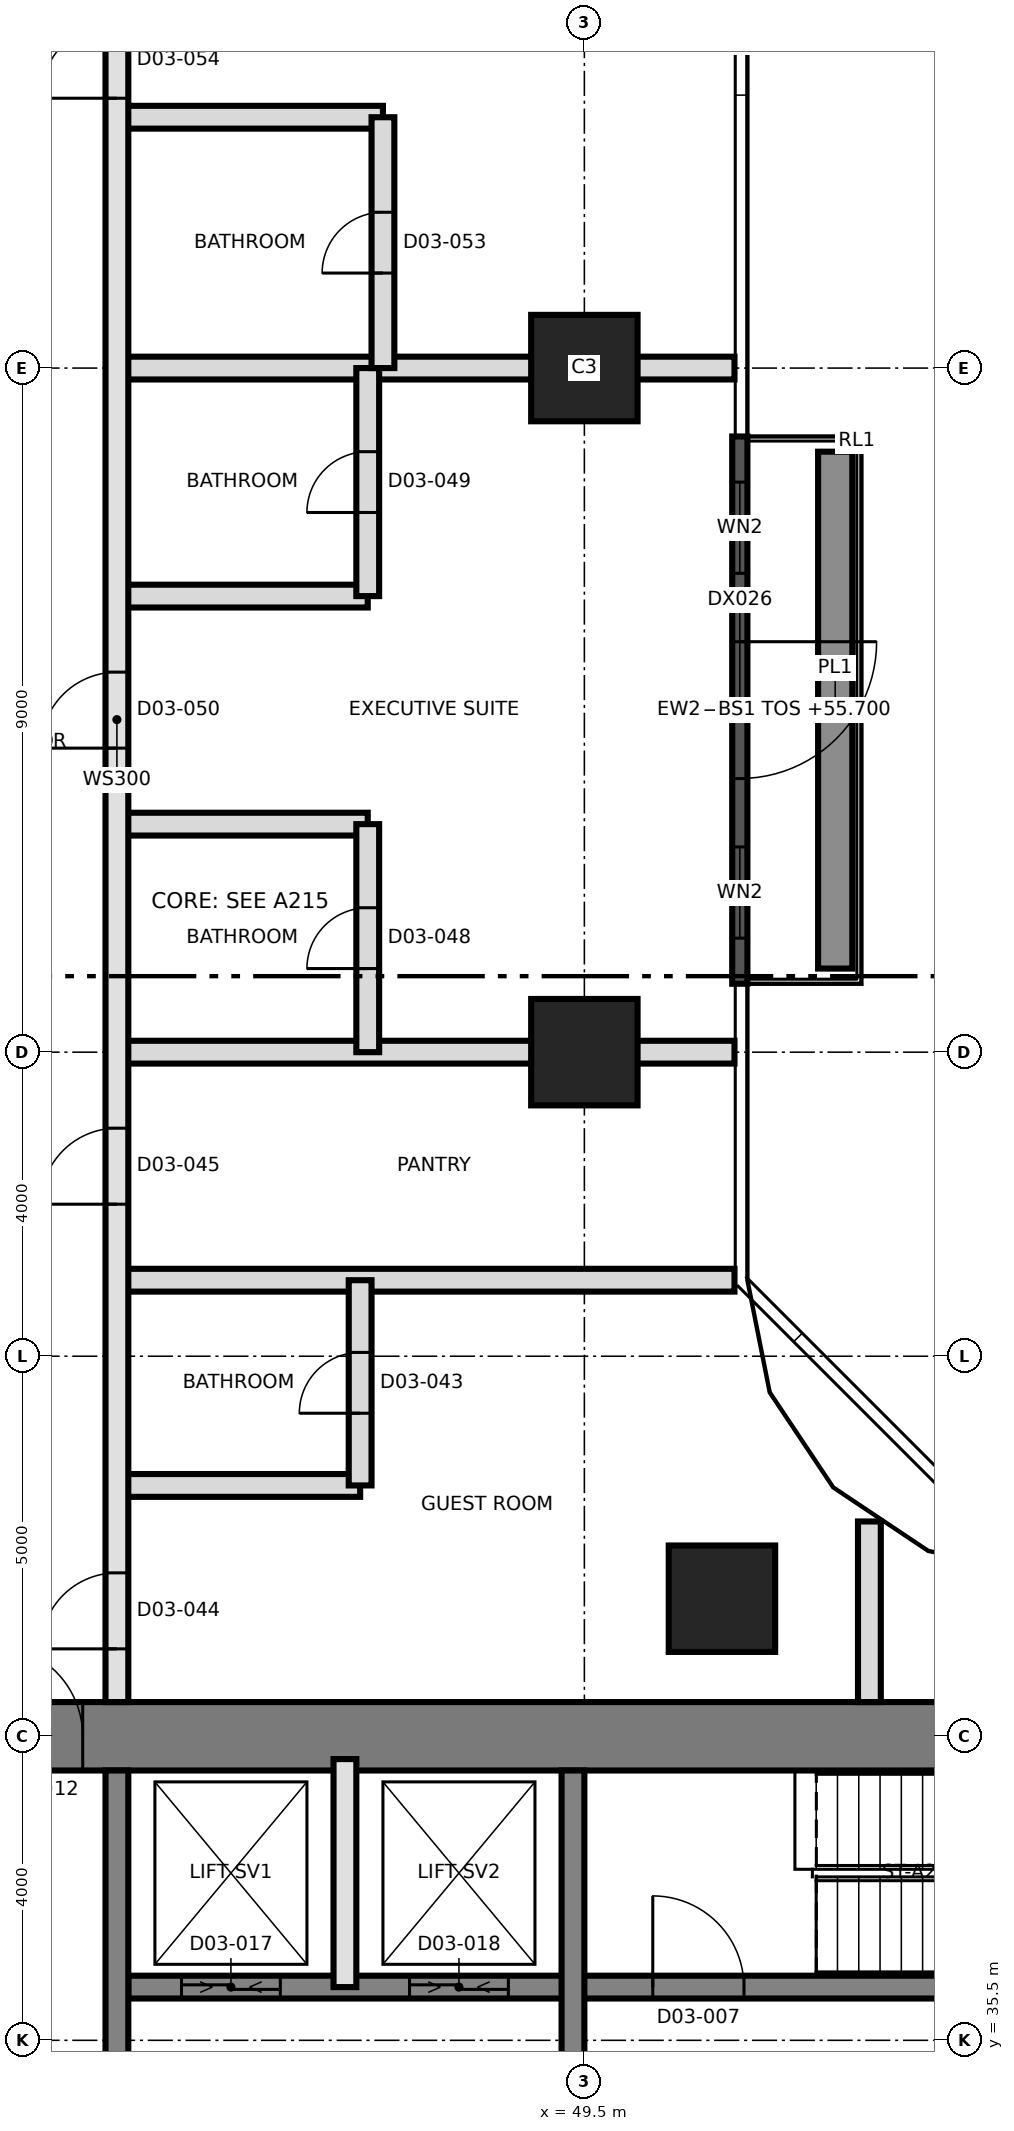
"""IFC4 building model, lengths in metres.
Left out: names, types, materials, properties, quantities, classifications, styles, units other than length and angle.
Written with IfcOpenShell. Run it as: python <this file> out.ifc"""

import sys

from ifc_helpers import new_model, si_unit, direction, frame, frame_2d, origin, origin_2d, place, context, subcontext, project, spatial, rectangle, extrude, element, fill, save


model = new_model("IFC4")
c1 = context("Model", 3, precision=1e-05, world=origin(), true_north=direction((0.0, 1.0)))
c2 = subcontext(c1, "Body", "Model", "MODEL_VIEW")
j1 = project(units=[si_unit("LENGTHUNIT", "METRE"), si_unit("PLANEANGLEUNIT", "RADIAN")], contexts=[c1])
p1 = place(None, origin())
s1 = spatial("IfcSite", under=j1, at=p1, CompositionType="ELEMENT")
p2 = place(p1, origin())
s2 = spatial("IfcBuilding", under=s1, at=p2, CompositionType="ELEMENT")
p3 = place(p2, frame((0.0, 0.0, 55.7)))
s3 = spatial("IfcBuildingStorey", under=s2, at=p3, CompositionType="ELEMENT", Elevation=55.7)
p4 = place(p3, frame((31.05, 39.5, 0.0), z_axis=(0.0, 0.0, 1.0), x_axis=(1.0, 0.0, 0.0)))
e1 = element("IfcWall", 1, at=p4, inside=s3, PredefinedType="SHEAR", context=c2, shape_type="SweptSolid", body=[
    extrude(rectangle(XDim=27.0, YDim=0.9, at=frame_2d((13.5, 0.0))), origin(), (0.0, 0.0, 1.0), 3.7),
])
p5 = place(p4, frame((10.65, 0.0, 0.0)))
e2 = element("IfcOpeningElement", 2, at=p5, cuts=e1, PredefinedType="OPENING", context=c2, shape_type="SweptSolid", body=[
    extrude(rectangle(XDim=1.2, YDim=2.1, at=frame_2d((0.6, 1.05))), frame((0.0, 0.46, 0.0), z_axis=(0.0, -1.0, 0.0), x_axis=(1.0, 0.0, 0.0)), (0.0, 0.0, 1.0), 0.92),
])
p6 = place(p3, frame((43.5, 36.2, 0.0), z_axis=(0.0, 0.0, 1.0), x_axis=(1.0, 0.0, 0.0)))
e3 = element("IfcWall", 3, at=p6, inside=s3, PredefinedType="SHEAR", context=c2, shape_type="SweptSolid", body=[
    extrude(rectangle(XDim=14.55, YDim=0.3, at=frame_2d((7.275, 0.0))), origin(), (0.0, 0.0, 1.0), 3.7),
])
p7 = place(p6, frame((6.9, 0.0, 0.0)))
e4 = element("IfcOpeningElement", 4, at=p7, cuts=e3, PredefinedType="OPENING", context=c2, shape_type="SweptSolid", body=[
    extrude(rectangle(XDim=1.2, YDim=2.1, at=frame_2d((0.6, 1.05))), frame((0.0, 0.16, 0.0), z_axis=(0.0, -1.0, 0.0), x_axis=(1.0, 0.0, 0.0)), (0.0, 0.0, 1.0), 0.32),
])
p8 = place(p6, frame((0.7, 0.0, 0.0)))
e5 = element("IfcOpeningElement", 5, at=p8, cuts=e3, PredefinedType="OPENING", context=c2, shape_type="SweptSolid", body=[
    extrude(rectangle(XDim=1.3, YDim=2.4, at=frame_2d((0.65, 1.2))), frame((0.0, 0.16, 0.0), z_axis=(0.0, -1.0, 0.0), x_axis=(1.0, 0.0, 0.0)), (0.0, 0.0, 1.0), 0.32),
])
p9 = place(p6, frame((3.7, 0.0, 0.0)))
e6 = element("IfcOpeningElement", 6, at=p9, cuts=e3, PredefinedType="OPENING", context=c2, shape_type="SweptSolid", body=[
    extrude(rectangle(XDim=1.3, YDim=2.4, at=frame_2d((0.65, 1.2))), frame((0.0, 0.16, 0.0), z_axis=(0.0, -1.0, 0.0), x_axis=(1.0, 0.0, 0.0)), (0.0, 0.0, 1.0), 0.32),
])
for number, where, z_axis, x_axis in (
    (7, (43.35, 33.5, 0.0), (0.0, 0.0, 1.0), (0.0, 1.0, 0.0)),
    (8, (49.35, 33.5, 0.0), (0.0, 0.0, 1.0), (0.0, 1.0, 0.0)),
):
    element("IfcWall", number, at=place(p3, frame(where, z_axis=z_axis, x_axis=x_axis)), inside=s3, PredefinedType="SHEAR", context=c2, shape_type="SweptSolid", body=[
        extrude(rectangle(XDim=5.55, YDim=0.3, at=frame_2d((2.775, 0.0))), origin(), (0.0, 0.0, 1.0), 3.7),
    ])
for number, where, z_axis, x_axis in (
    (9, (51.31, 41.31, 0.0), (0.0, 0.0, 1.0), (1.0, 0.0, 0.0)),
    (10, (49.5, 48.5, 0.0), (0.0, 0.0, 1.0), (1.0, 0.0, 0.0)),
    (11, (49.5, 57.5, 0.0), (0.0, 0.0, 1.0), (1.0, 0.0, 0.0)),
):
    element("IfcColumn", number, at=place(p3, frame(where, z_axis=z_axis, x_axis=x_axis)), inside=s3, PredefinedType="COLUMN", context=c2, shape_type="SweptSolid", body=[
        extrude(rectangle(XDim=1.4, YDim=1.4, at=origin_2d()), origin(), (0.0, 0.0, 1.0), 3.7),
    ])
p10 = place(p3, frame((52.8, 53.0, 0.0), z_axis=(0.0, 0.0, 1.0), x_axis=(1.0, 0.0, 0.0)))
e12 = element("IfcWall", 12, at=p10, inside=s3, PredefinedType="SOLIDWALL", context=c2, shape_type="SweptSolid", body=[
    extrude(rectangle(XDim=0.45, YDim=6.8, at=origin_2d()), origin(), (0.0, 0.0, 1.0), 1.0),
])
p11 = place(p3, frame((51.545, 56.6, 0.0), z_axis=(0.0, 0.0, 1.0), x_axis=(0.0, -1.0, 0.0)))
e13 = element("IfcWall", 13, at=p11, inside=s3, PredefinedType="SOLIDWALL", context=c2, shape_type="SweptSolid", body=[
    extrude(rectangle(XDim=7.2, YDim=0.2, at=frame_2d((3.6, 0.0))), origin(), (0.0, 0.0, 1.0), 3.4),
])
p12 = place(p11, frame((2.7, 0.0, 0.0)))
e14 = element("IfcOpeningElement", 14, at=p12, cuts=e13, PredefinedType="OPENING", context=c2, shape_type="SweptSolid", body=[
    extrude(rectangle(XDim=1.8, YDim=2.4, at=frame_2d((0.9, 1.2))), frame((0.0, 0.11, 0.0), z_axis=(0.0, -1.0, 0.0), x_axis=(1.0, 0.0, 0.0)), (0.0, 0.0, 1.0), 0.22),
])
p13 = place(p11, frame((5.4, 0.0, 0.9)))
e15 = element("IfcOpeningElement", 15, at=p13, cuts=e13, PredefinedType="OPENING", context=c2, shape_type="SweptSolid", body=[
    extrude(rectangle(XDim=1.2, YDim=2.1, at=frame_2d((0.6, 1.05))), frame((0.0, 0.11, 0.0), z_axis=(0.0, -1.0, 0.0), x_axis=(1.0, 0.0, 0.0)), (0.0, 0.0, 1.0), 0.22),
])
p14 = place(p11, frame((0.6, 0.0, 0.9)))
e16 = element("IfcOpeningElement", 16, at=p14, cuts=e13, PredefinedType="OPENING", context=c2, shape_type="SweptSolid", body=[
    extrude(rectangle(XDim=1.2, YDim=2.1, at=frame_2d((0.6, 1.05))), frame((0.0, 0.11, 0.0), z_axis=(0.0, -1.0, 0.0), x_axis=(1.0, 0.0, 0.0)), (0.0, 0.0, 1.0), 0.22),
])
p15 = place(p3, frame((46.35, 36.2, 0.0), z_axis=(0.0, 0.0, 1.0), x_axis=(0.0, 1.0, 0.0)))
e17 = element("IfcWall", 17, at=p15, inside=s3, PredefinedType="SOLIDWALL", context=c2, shape_type="SweptSolid", body=[
    extrude(rectangle(XDim=3.0, YDim=0.3, at=frame_2d((1.5, 0.0))), origin(), (0.0, 0.0, 1.0), 3.4),
])
p16 = place(p3, frame((43.35, 42.8, 0.0), z_axis=(0.0, 0.0, 1.0), x_axis=(1.0, 0.0, 0.0)))
e18 = element("IfcWall", 18, at=p16, inside=s3, PredefinedType="PARTITIONING", context=c2, shape_type="SweptSolid", body=[
    extrude(rectangle(XDim=3.2, YDim=0.3, at=frame_2d((1.6, 0.0))), origin(), (0.0, 0.0, 1.0), 3.4),
])
for number, where, z_axis, x_axis in (
    (19, (43.35, 45.5, 0.0), (0.0, 0.0, 1.0), (1.0, 0.0, 0.0)),
    (20, (43.35, 48.5, 0.0), (0.0, 0.0, 1.0), (1.0, 0.0, 0.0)),
):
    element("IfcWall", number, at=place(p3, frame(where, z_axis=z_axis, x_axis=x_axis)), inside=s3, PredefinedType="PARTITIONING", context=c2, shape_type="SweptSolid", body=[
        extrude(rectangle(XDim=8.125, YDim=0.3, at=frame_2d((4.062, 0.0))), origin(), (0.0, 0.0, 1.0), 3.4),
    ])
for number, where, z_axis, x_axis in (
    (21, (43.35, 51.5, 0.0), (0.0, 0.0, 1.0), (1.0, 0.0, 0.0)),
    (22, (43.35, 54.5, 0.0), (0.0, 0.0, 1.0), (1.0, 0.0, 0.0)),
):
    element("IfcWall", number, at=place(p3, frame(where, z_axis=z_axis, x_axis=x_axis)), inside=s3, PredefinedType="PARTITIONING", context=c2, shape_type="SweptSolid", body=[
        extrude(rectangle(XDim=3.3, YDim=0.3, at=frame_2d((1.65, 0.0))), origin(), (0.0, 0.0, 1.0), 3.4),
    ])
p17 = place(p3, frame((43.35, 57.5, 0.0), z_axis=(0.0, 0.0, 1.0), x_axis=(1.0, 0.0, 0.0)))
e23 = element("IfcWall", 23, at=p17, inside=s3, PredefinedType="PARTITIONING", context=c2, shape_type="SweptSolid", body=[
    extrude(rectangle(XDim=8.125, YDim=0.3, at=frame_2d((4.062, 0.0))), origin(), (0.0, 0.0, 1.0), 3.4),
])
p18 = place(p3, frame((43.35, 60.8, 0.0), z_axis=(0.0, 0.0, 1.0), x_axis=(1.0, 0.0, 0.0)))
e24 = element("IfcWall", 24, at=p18, inside=s3, PredefinedType="PARTITIONING", context=c2, shape_type="SweptSolid", body=[
    extrude(rectangle(XDim=3.5, YDim=0.3, at=frame_2d((1.75, 0.0))), origin(), (0.0, 0.0, 1.0), 3.4),
])
p19 = place(p3, frame((43.35, 39.95, 0.0), z_axis=(0.0, 0.0, 1.0), x_axis=(0.0, 1.0, 0.0)))
e25 = element("IfcWall", 25, at=p19, inside=s3, PredefinedType="SOLIDWALL", context=c2, shape_type="SweptSolid", body=[
    extrude(rectangle(XDim=25.85, YDim=0.3, at=frame_2d((12.925, 0.0))), origin(), (0.0, 0.0, 1.0), 3.4),
])
p20 = place(p19, frame((0.7, 0.0, 0.0)))
e26 = element("IfcOpeningElement", 26, at=p20, cuts=e25, PredefinedType="OPENING", context=c2, shape_type="SweptSolid", body=[
    extrude(rectangle(XDim=1.0, YDim=2.1, at=frame_2d((0.5, 1.05))), frame((0.0, 0.16, 0.0), z_axis=(0.0, -1.0, 0.0), x_axis=(1.0, 0.0, 0.0)), (0.0, 0.0, 1.0), 0.32),
])
p21 = place(p19, frame((6.55, 0.0, 0.0)))
e27 = element("IfcOpeningElement", 27, at=p21, cuts=e25, PredefinedType="OPENING", context=c2, shape_type="SweptSolid", body=[
    extrude(rectangle(XDim=1.0, YDim=2.1, at=frame_2d((0.5, 1.05))), frame((0.0, 0.16, 0.0), z_axis=(0.0, -1.0, 0.0), x_axis=(1.0, 0.0, 0.0)), (0.0, 0.0, 1.0), 0.32),
])
p22 = place(p19, frame((12.55, 0.0, 0.0)))
e28 = element("IfcOpeningElement", 28, at=p22, cuts=e25, PredefinedType="OPENING", context=c2, shape_type="SweptSolid", body=[
    extrude(rectangle(XDim=1.0, YDim=2.4, at=frame_2d((0.5, 1.2))), frame((0.0, 0.16, 0.0), z_axis=(0.0, -1.0, 0.0), x_axis=(1.0, 0.0, 0.0)), (0.0, 0.0, 1.0), 0.32),
])
p23 = place(p19, frame((21.1, 0.0, 0.0)))
e29 = element("IfcOpeningElement", 29, at=p23, cuts=e25, PredefinedType="OPENING", context=c2, shape_type="SweptSolid", body=[
    extrude(rectangle(XDim=1.0, YDim=2.4, at=frame_2d((0.5, 1.2))), frame((0.0, 0.16, 0.0), z_axis=(0.0, -1.0, 0.0), x_axis=(1.0, 0.0, 0.0)), (0.0, 0.0, 1.0), 0.32),
])
p24 = place(p3, frame((46.55, 42.8, 0.0), z_axis=(0.0, 0.0, 1.0), x_axis=(0.0, 1.0, 0.0)))
e30 = element("IfcWall", 30, at=p24, inside=s3, PredefinedType="PARTITIONING", context=c2, shape_type="SweptSolid", body=[
    extrude(rectangle(XDim=2.7, YDim=0.3, at=frame_2d((1.35, 0.0))), origin(), (0.0, 0.0, 1.0), 3.4),
])
p25 = place(p24, frame((0.95, 0.0, 0.0)))
e31 = element("IfcOpeningElement", 31, at=p25, cuts=e30, PredefinedType="OPENING", context=c2, shape_type="SweptSolid", body=[
    extrude(rectangle(XDim=0.8, YDim=2.1, at=frame_2d((0.4, 1.05))), frame((0.0, 0.16, 0.0), z_axis=(0.0, -1.0, 0.0), x_axis=(1.0, 0.0, 0.0)), (0.0, 0.0, 1.0), 0.32),
])
p26 = place(p3, frame((46.65, 48.5, 0.0), z_axis=(0.0, 0.0, 1.0), x_axis=(0.0, 1.0, 0.0)))
e32 = element("IfcWall", 32, at=p26, inside=s3, PredefinedType="PARTITIONING", context=c2, shape_type="SweptSolid", body=[
    extrude(rectangle(XDim=3.0, YDim=0.3, at=frame_2d((1.5, 0.0))), origin(), (0.0, 0.0, 1.0), 3.4),
])
p27 = place(p26, frame((1.1, 0.0, 0.0)))
e33 = element("IfcOpeningElement", 33, at=p27, cuts=e32, PredefinedType="OPENING", context=c2, shape_type="SweptSolid", body=[
    extrude(rectangle(XDim=0.8, YDim=2.1, at=frame_2d((0.4, 1.05))), frame((0.0, 0.16, 0.0), z_axis=(0.0, -1.0, 0.0), x_axis=(1.0, 0.0, 0.0)), (0.0, 0.0, 1.0), 0.32),
])
p28 = place(p3, frame((46.65, 54.5, 0.0), z_axis=(0.0, 0.0, 1.0), x_axis=(0.0, 1.0, 0.0)))
e34 = element("IfcWall", 34, at=p28, inside=s3, PredefinedType="PARTITIONING", context=c2, shape_type="SweptSolid", body=[
    extrude(rectangle(XDim=3.0, YDim=0.3, at=frame_2d((1.5, 0.0))), origin(), (0.0, 0.0, 1.0), 3.4),
])
p29 = place(p28, frame((1.1, 0.0, 0.0)))
e35 = element("IfcOpeningElement", 35, at=p29, cuts=e34, PredefinedType="OPENING", context=c2, shape_type="SweptSolid", body=[
    extrude(rectangle(XDim=0.8, YDim=2.1, at=frame_2d((0.4, 1.05))), frame((0.0, 0.16, 0.0), z_axis=(0.0, -1.0, 0.0), x_axis=(1.0, 0.0, 0.0)), (0.0, 0.0, 1.0), 0.32),
])
p30 = place(p3, frame((46.85, 57.5, 0.0), z_axis=(0.0, 0.0, 1.0), x_axis=(0.0, 1.0, 0.0)))
e36 = element("IfcWall", 36, at=p30, inside=s3, PredefinedType="PARTITIONING", context=c2, shape_type="SweptSolid", body=[
    extrude(rectangle(XDim=3.3, YDim=0.3, at=frame_2d((1.65, 0.0))), origin(), (0.0, 0.0, 1.0), 3.4),
])
p31 = place(p30, frame((1.25, 0.0, 0.0)))
e37 = element("IfcOpeningElement", 37, at=p31, cuts=e36, PredefinedType="OPENING", context=c2, shape_type="SweptSolid", body=[
    extrude(rectangle(XDim=0.8, YDim=2.1, at=frame_2d((0.4, 1.05))), frame((0.0, 0.16, 0.0), z_axis=(0.0, -1.0, 0.0), x_axis=(1.0, 0.0, 0.0)), (0.0, 0.0, 1.0), 0.32),
])
p32 = place(p3, frame((53.25, 39.95, 0.0), z_axis=(0.0, 0.0, 1.0), x_axis=(0.0, 1.0, 0.0)))
e38 = element("IfcWall", 38, at=p32, inside=s3, PredefinedType="PARTITIONING", context=c2, shape_type="SweptSolid", body=[
    extrude(rectangle(XDim=2.376, YDim=0.3, at=frame_2d((1.188, 0.0))), origin(), (0.0, 0.0, 1.0), 3.4),
])
p33 = place(p12, origin())
e39 = element("IfcDoor", 39, at=p33, inside=s3, OperationType="SINGLE_SWING_LEFT", PredefinedType="DOOR", context=c2, shape_type="SweptSolid", body=[
    extrude(rectangle(XDim=1.8, YDim=2.4, at=frame_2d((0.9, 1.2))), frame((0.0, 0.025, 0.0), z_axis=(0.0, -1.0, 0.0), x_axis=(1.0, 0.0, 0.0)), (0.0, 0.0, 1.0), 0.05),
])
fill(e14, e39)
p34 = place(p13, origin())
e40 = element("IfcWindow", 40, at=p34, inside=s3, PartitioningType="SINGLE_PANEL", PredefinedType="WINDOW", context=c2, shape_type="SweptSolid", body=[
    extrude(rectangle(XDim=1.2, YDim=2.1, at=frame_2d((0.6, 1.05))), frame((0.0, 0.03, 0.0), z_axis=(0.0, -1.0, 0.0), x_axis=(1.0, 0.0, 0.0)), (0.0, 0.0, 1.0), 0.06),
])
fill(e15, e40)
p35 = place(p14, origin())
e41 = element("IfcWindow", 41, at=p35, inside=s3, PartitioningType="SINGLE_PANEL", PredefinedType="WINDOW", context=c2, shape_type="SweptSolid", body=[
    extrude(rectangle(XDim=1.2, YDim=2.1, at=frame_2d((0.6, 1.05))), frame((0.0, 0.03, 0.0), z_axis=(0.0, -1.0, 0.0), x_axis=(1.0, 0.0, 0.0)), (0.0, 0.0, 1.0), 0.06),
])
fill(e16, e41)
p36 = place(p7, origin())
e42 = element("IfcDoor", 42, at=p36, inside=s3, OperationType="SINGLE_SWING_LEFT", PredefinedType="DOOR", context=c2, shape_type="SweptSolid", body=[
    extrude(rectangle(XDim=1.2, YDim=2.1, at=frame_2d((0.6, 1.05))), frame((0.0, 0.025, 0.0), z_axis=(0.0, -1.0, 0.0), x_axis=(1.0, 0.0, 0.0)), (0.0, 0.0, 1.0), 0.05),
])
fill(e4, e42)
p37 = place(p5, origin())
e43 = element("IfcDoor", 43, at=p37, inside=s3, OperationType="SINGLE_SWING_RIGHT", PredefinedType="DOOR", context=c2, shape_type="SweptSolid", body=[
    extrude(rectangle(XDim=1.2, YDim=2.1, at=frame_2d((0.6, 1.05))), frame((0.0, 0.025, 0.0), z_axis=(0.0, -1.0, 0.0), x_axis=(1.0, 0.0, 0.0)), (0.0, 0.0, 1.0), 0.05),
])
fill(e2, e43)
p38 = place(p8, origin())
e44 = element("IfcDoor", 44, at=p38, inside=s3, OperationType="SLIDING_TO_LEFT", PredefinedType="DOOR", context=c2, shape_type="SweptSolid", body=[
    extrude(rectangle(XDim=1.3, YDim=2.4, at=frame_2d((0.65, 1.2))), frame((0.0, 0.025, 0.0), z_axis=(0.0, -1.0, 0.0), x_axis=(1.0, 0.0, 0.0)), (0.0, 0.0, 1.0), 0.05),
])
fill(e5, e44)
p39 = place(p9, origin())
e45 = element("IfcDoor", 45, at=p39, inside=s3, OperationType="SLIDING_TO_LEFT", PredefinedType="DOOR", context=c2, shape_type="SweptSolid", body=[
    extrude(rectangle(XDim=1.3, YDim=2.4, at=frame_2d((0.65, 1.2))), frame((0.0, 0.025, 0.0), z_axis=(0.0, -1.0, 0.0), x_axis=(1.0, 0.0, 0.0)), (0.0, 0.0, 1.0), 0.05),
])
fill(e6, e45)
p40 = place(p25, origin())
e46 = element("IfcDoor", 46, at=p40, inside=s3, OperationType="SINGLE_SWING_LEFT", PredefinedType="DOOR", context=c2, shape_type="SweptSolid", body=[
    extrude(rectangle(XDim=0.8, YDim=2.1, at=frame_2d((0.4, 1.05))), frame((0.0, 0.025, 0.0), z_axis=(0.0, -1.0, 0.0), x_axis=(1.0, 0.0, 0.0)), (0.0, 0.0, 1.0), 0.05),
])
fill(e31, e46)
p41 = place(p20, origin())
e47 = element("IfcDoor", 47, at=p41, inside=s3, OperationType="SINGLE_SWING_RIGHT", PredefinedType="DOOR", context=c2, shape_type="SweptSolid", body=[
    extrude(rectangle(XDim=1.0, YDim=2.1, at=frame_2d((0.5, 1.05))), frame((0.0, 0.025, 0.0), z_axis=(0.0, -1.0, 0.0), x_axis=(1.0, 0.0, 0.0)), (0.0, 0.0, 1.0), 0.05),
])
fill(e26, e47)
p42 = place(p21, origin())
e48 = element("IfcDoor", 48, at=p42, inside=s3, OperationType="SINGLE_SWING_LEFT", PredefinedType="DOOR", context=c2, shape_type="SweptSolid", body=[
    extrude(rectangle(XDim=1.0, YDim=2.1, at=frame_2d((0.5, 1.05))), frame((0.0, 0.025, 0.0), z_axis=(0.0, -1.0, 0.0), x_axis=(1.0, 0.0, 0.0)), (0.0, 0.0, 1.0), 0.05),
])
fill(e27, e48)
p43 = place(p27, origin())
e49 = element("IfcDoor", 49, at=p43, inside=s3, OperationType="SINGLE_SWING_RIGHT", PredefinedType="DOOR", context=c2, shape_type="SweptSolid", body=[
    extrude(rectangle(XDim=0.8, YDim=2.1, at=frame_2d((0.4, 1.05))), frame((0.0, 0.025, 0.0), z_axis=(0.0, -1.0, 0.0), x_axis=(1.0, 0.0, 0.0)), (0.0, 0.0, 1.0), 0.05),
])
fill(e33, e49)
p44 = place(p29, origin())
e50 = element("IfcDoor", 50, at=p44, inside=s3, OperationType="SINGLE_SWING_LEFT", PredefinedType="DOOR", context=c2, shape_type="SweptSolid", body=[
    extrude(rectangle(XDim=0.8, YDim=2.1, at=frame_2d((0.4, 1.05))), frame((0.0, 0.025, 0.0), z_axis=(0.0, -1.0, 0.0), x_axis=(1.0, 0.0, 0.0)), (0.0, 0.0, 1.0), 0.05),
])
fill(e35, e50)
p45 = place(p22, origin())
e51 = element("IfcDoor", 51, at=p45, inside=s3, OperationType="SINGLE_SWING_LEFT", PredefinedType="DOOR", context=c2, shape_type="SweptSolid", body=[
    extrude(rectangle(XDim=1.0, YDim=2.4, at=frame_2d((0.5, 1.2))), frame((0.0, 0.025, 0.0), z_axis=(0.0, -1.0, 0.0), x_axis=(1.0, 0.0, 0.0)), (0.0, 0.0, 1.0), 0.05),
])
fill(e28, e51)
p46 = place(p31, origin())
e52 = element("IfcDoor", 52, at=p46, inside=s3, OperationType="SINGLE_SWING_LEFT", PredefinedType="DOOR", context=c2, shape_type="SweptSolid", body=[
    extrude(rectangle(XDim=0.8, YDim=2.1, at=frame_2d((0.4, 1.05))), frame((0.0, 0.025, 0.0), z_axis=(0.0, -1.0, 0.0), x_axis=(1.0, 0.0, 0.0)), (0.0, 0.0, 1.0), 0.05),
])
fill(e37, e52)
p47 = place(p23, origin())
e53 = element("IfcDoor", 53, at=p47, inside=s3, OperationType="SINGLE_SWING_LEFT", PredefinedType="DOOR", context=c2, shape_type="SweptSolid", body=[
    extrude(rectangle(XDim=1.0, YDim=2.4, at=frame_2d((0.5, 1.2))), frame((0.0, 0.025, 0.0), z_axis=(0.0, -1.0, 0.0), x_axis=(1.0, 0.0, 0.0)), (0.0, 0.0, 1.0), 0.05),
])
fill(e29, e53)
save(model, sys.argv[1])
